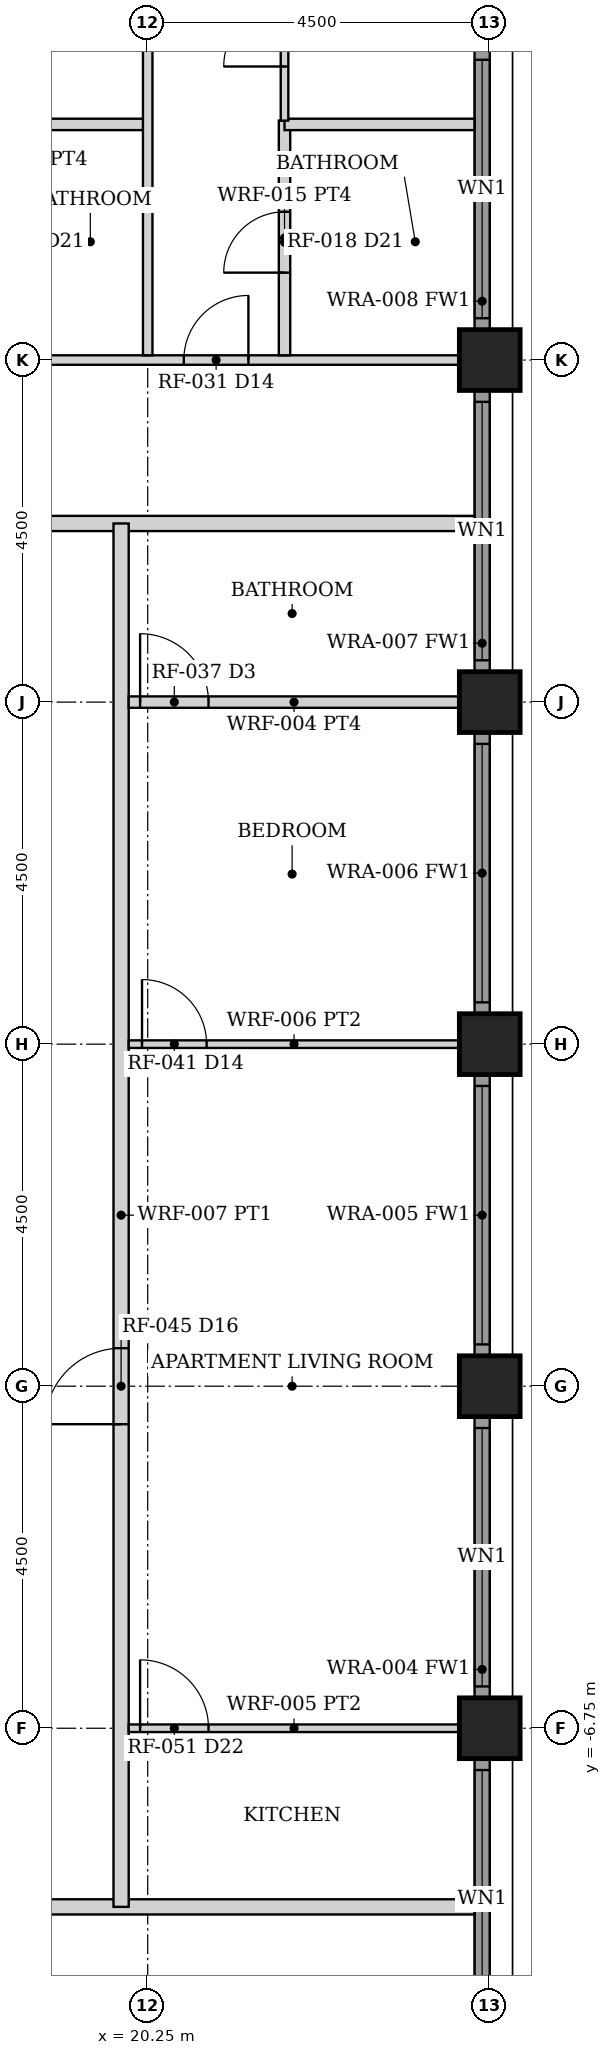
"""IFC4 building model, lengths in metres.
Left out: names, types, materials, properties, quantities, classifications, styles, units other than length and angle.
Written with IfcOpenShell. Run it as: python <this file> out.ifc"""

import sys

from ifc_helpers import new_model, si_unit, direction, frame, frame_2d, origin, origin_2d, place, context, subcontext, project, spatial, rectangle, hollow_rectangle, extrude, element, fill, save


model = new_model("IFC4")
c1 = context("Model", 3, precision=1e-05, world=origin(), true_north=direction((0.0, 1.0)))
c2 = subcontext(c1, "Body", "Model", "MODEL_VIEW")
j1 = project(units=[si_unit("LENGTHUNIT", "METRE"), si_unit("PLANEANGLEUNIT", "RADIAN")], contexts=[c1])
p1 = place(None, origin())
s1 = spatial("IfcSite", under=j1, at=p1, CompositionType="ELEMENT")
p2 = place(p1, origin())
s2 = spatial("IfcBuilding", under=s1, at=p2, CompositionType="ELEMENT")
p3 = place(p2, frame((0.0, 0.0, 79.0)))
s3 = spatial("IfcBuildingStorey", under=s2, at=p3, CompositionType="ELEMENT", Elevation=79.0)
for number, where, z_axis, x_axis in (
    (1, (24.75, -6.75, 0.0), (0.0, 0.0, 1.0), (1.0, 0.0, 0.0)),
    (2, (24.75, -2.25, 0.0), (0.0, 0.0, 1.0), (1.0, 0.0, 0.0)),
    (3, (24.75, 2.25, 0.0), (0.0, 0.0, 1.0), (1.0, 0.0, 0.0)),
    (4, (24.75, 6.75, 0.0), (0.0, 0.0, 1.0), (1.0, 0.0, 0.0)),
    (5, (24.75, 11.25, 0.0), (0.0, 0.0, 1.0), (1.0, 0.0, 0.0)),
):
    element("IfcColumn", number, at=place(p3, frame(where, z_axis=z_axis, x_axis=x_axis)), inside=s3, PredefinedType="COLUMN", context=c2, shape_type="SweptSolid", body=[
        extrude(hollow_rectangle(XDim=0.8, YDim=0.8, WallThickness=0.06, at=origin_2d()), origin(), (0.0, 0.0, 1.0), 3.5),
    ])
p4 = place(p3, frame((24.65, -10.845, 0.0), z_axis=(0.0, 0.0, 1.0), x_axis=(0.0, 1.0, 0.0)))
e6 = element("IfcWall", 6, at=p4, inside=s3, PredefinedType="SOLIDWALL", context=c2, shape_type="SweptSolid", body=[
    extrude(rectangle(XDim=3.69, YDim=0.2, at=frame_2d((1.845, 0.0))), origin(), (0.0, 0.0, 1.0), 2.379),
])
p5 = place(p4, frame((0.145, 0.0, 0.3)))
e7 = element("IfcOpeningElement", 7, at=p5, cuts=e6, PredefinedType="OPENING", context=c2, shape_type="SweptSolid", body=[
    extrude(rectangle(XDim=3.4, YDim=1.929, at=frame_2d((1.7, 0.964))), frame((0.0, 0.11, 0.0), z_axis=(0.0, -1.0, 0.0), x_axis=(1.0, 0.0, 0.0)), (0.0, 0.0, 1.0), 0.22),
])
p6 = place(p3, frame((24.65, -6.345, 0.0), z_axis=(0.0, 0.0, 1.0), x_axis=(0.0, 1.0, 0.0)))
e8 = element("IfcWall", 8, at=p6, inside=s3, PredefinedType="SOLIDWALL", context=c2, shape_type="SweptSolid", body=[
    extrude(rectangle(XDim=3.69, YDim=0.2, at=frame_2d((1.845, 0.0))), origin(), (0.0, 0.0, 1.0), 2.379),
])
p7 = place(p6, frame((0.145, 0.0, 0.3)))
e9 = element("IfcOpeningElement", 9, at=p7, cuts=e8, PredefinedType="OPENING", context=c2, shape_type="SweptSolid", body=[
    extrude(rectangle(XDim=3.4, YDim=1.929, at=frame_2d((1.7, 0.964))), frame((0.0, 0.11, 0.0), z_axis=(0.0, -1.0, 0.0), x_axis=(1.0, 0.0, 0.0)), (0.0, 0.0, 1.0), 0.22),
])
p8 = place(p3, frame((24.65, -1.845, 0.0), z_axis=(0.0, 0.0, 1.0), x_axis=(0.0, 1.0, 0.0)))
e10 = element("IfcWall", 10, at=p8, inside=s3, PredefinedType="SOLIDWALL", context=c2, shape_type="SweptSolid", body=[
    extrude(rectangle(XDim=3.69, YDim=0.2, at=frame_2d((1.845, 0.0))), origin(), (0.0, 0.0, 1.0), 2.379),
])
p9 = place(p8, frame((0.145, 0.0, 0.3)))
e11 = element("IfcOpeningElement", 11, at=p9, cuts=e10, PredefinedType="OPENING", context=c2, shape_type="SweptSolid", body=[
    extrude(rectangle(XDim=3.4, YDim=1.929, at=frame_2d((1.7, 0.964))), frame((0.0, 0.11, 0.0), z_axis=(0.0, -1.0, 0.0), x_axis=(1.0, 0.0, 0.0)), (0.0, 0.0, 1.0), 0.22),
])
p10 = place(p3, frame((24.65, 2.655, 0.0), z_axis=(0.0, 0.0, 1.0), x_axis=(0.0, 1.0, 0.0)))
e12 = element("IfcWall", 12, at=p10, inside=s3, PredefinedType="SOLIDWALL", context=c2, shape_type="SweptSolid", body=[
    extrude(rectangle(XDim=3.69, YDim=0.2, at=frame_2d((1.845, 0.0))), origin(), (0.0, 0.0, 1.0), 2.379),
])
p11 = place(p10, frame((0.145, 0.0, 0.3)))
e13 = element("IfcOpeningElement", 13, at=p11, cuts=e12, PredefinedType="OPENING", context=c2, shape_type="SweptSolid", body=[
    extrude(rectangle(XDim=3.4, YDim=1.929, at=frame_2d((1.7, 0.964))), frame((0.0, 0.11, 0.0), z_axis=(0.0, -1.0, 0.0), x_axis=(1.0, 0.0, 0.0)), (0.0, 0.0, 1.0), 0.22),
])
p12 = place(p3, frame((24.65, 7.155, 0.0), z_axis=(0.0, 0.0, 1.0), x_axis=(0.0, 1.0, 0.0)))
e14 = element("IfcWall", 14, at=p12, inside=s3, PredefinedType="SOLIDWALL", context=c2, shape_type="SweptSolid", body=[
    extrude(rectangle(XDim=3.69, YDim=0.2, at=frame_2d((1.845, 0.0))), origin(), (0.0, 0.0, 1.0), 2.379),
])
p13 = place(p12, frame((0.145, 0.0, 0.3)))
e15 = element("IfcOpeningElement", 15, at=p13, cuts=e14, PredefinedType="OPENING", context=c2, shape_type="SweptSolid", body=[
    extrude(rectangle(XDim=3.4, YDim=1.929, at=frame_2d((1.7, 0.964))), frame((0.0, 0.11, 0.0), z_axis=(0.0, -1.0, 0.0), x_axis=(1.0, 0.0, 0.0)), (0.0, 0.0, 1.0), 0.22),
])
p14 = place(p3, frame((24.65, 11.655, 0.0), z_axis=(0.0, 0.0, 1.0), x_axis=(0.0, 1.0, 0.0)))
e16 = element("IfcWall", 16, at=p14, inside=s3, PredefinedType="SOLIDWALL", context=c2, shape_type="SweptSolid", body=[
    extrude(rectangle(XDim=3.69, YDim=0.2, at=frame_2d((1.845, 0.0))), origin(), (0.0, 0.0, 1.0), 2.379),
])
p15 = place(p14, frame((0.145, 0.0, 0.3)))
e17 = element("IfcOpeningElement", 17, at=p15, cuts=e16, PredefinedType="OPENING", context=c2, shape_type="SweptSolid", body=[
    extrude(rectangle(XDim=3.4, YDim=1.929, at=frame_2d((1.7, 0.964))), frame((0.0, 0.11, 0.0), z_axis=(0.0, -1.0, 0.0), x_axis=(1.0, 0.0, 0.0)), (0.0, 0.0, 1.0), 0.22),
])
p16 = place(p3, frame((-24.55, 9.1, 0.0), z_axis=(0.0, 0.0, 1.0), x_axis=(1.0, 0.0, 0.0)))
e18 = element("IfcWall", 18, at=p16, inside=s3, PredefinedType="PARTITIONING", context=c2, shape_type="SweptSolid", body=[
    extrude(rectangle(XDim=49.1, YDim=0.2, at=frame_2d((24.55, 0.0))), origin(), (0.0, 0.0, 1.0), 2.373),
])
p17 = place(p16, frame((22.55, 0.0, 0.0)))
e19 = element("IfcOpeningElement", 19, at=p17, cuts=e18, PredefinedType="OPENING", context=c2, shape_type="SweptSolid", body=[
    extrude(rectangle(XDim=1.0, YDim=2.3, at=frame_2d((0.5, 1.15))), frame((0.0, 0.11, 0.0), z_axis=(0.0, -1.0, 0.0), x_axis=(1.0, 0.0, 0.0)), (0.0, 0.0, 1.0), 0.22),
])
p18 = place(p16, frame((21.05, 0.0, 0.0)))
e20 = element("IfcOpeningElement", 20, at=p18, cuts=e18, PredefinedType="OPENING", context=c2, shape_type="SweptSolid", body=[
    extrude(rectangle(XDim=1.0, YDim=2.3, at=frame_2d((0.5, 1.15))), frame((0.0, 0.11, 0.0), z_axis=(0.0, -1.0, 0.0), x_axis=(1.0, 0.0, 0.0)), (0.0, 0.0, 1.0), 0.22),
])
p19 = place(p3, frame((-24.55, -9.1, 0.0), z_axis=(0.0, 0.0, 1.0), x_axis=(1.0, 0.0, 0.0)))
e21 = element("IfcWall", 21, at=p19, inside=s3, PredefinedType="PARTITIONING", context=c2, shape_type="SweptSolid", body=[
    extrude(rectangle(XDim=49.1, YDim=0.2, at=frame_2d((24.55, 0.0))), origin(), (0.0, 0.0, 1.0), 2.373),
])
p20 = place(p19, frame((25.55, 0.0, 0.0)))
e22 = element("IfcOpeningElement", 22, at=p20, cuts=e21, PredefinedType="OPENING", context=c2, shape_type="SweptSolid", body=[
    extrude(rectangle(XDim=1.0, YDim=2.3, at=frame_2d((0.5, 1.15))), frame((0.0, 0.11, 0.0), z_axis=(0.0, -1.0, 0.0), x_axis=(1.0, 0.0, 0.0)), (0.0, 0.0, 1.0), 0.22),
])
p21 = place(p19, frame((27.05, 0.0, 0.0)))
e23 = element("IfcOpeningElement", 23, at=p21, cuts=e21, PredefinedType="OPENING", context=c2, shape_type="SweptSolid", body=[
    extrude(rectangle(XDim=1.0, YDim=2.3, at=frame_2d((0.5, 1.15))), frame((0.0, 0.11, 0.0), z_axis=(0.0, -1.0, 0.0), x_axis=(1.0, 0.0, 0.0)), (0.0, 0.0, 1.0), 0.22),
])
p22 = place(p3, frame((19.9, -9.1, 0.0), z_axis=(0.0, 0.0, 1.0), x_axis=(0.0, 1.0, 0.0)))
e24 = element("IfcWall", 24, at=p22, inside=s3, PredefinedType="PARTITIONING", context=c2, shape_type="SweptSolid", body=[
    extrude(rectangle(XDim=18.2, YDim=0.2, at=frame_2d((9.1, 0.0))), origin(), (0.0, 0.0, 1.0), 2.373),
])
p23 = place(p22, frame((6.35, 0.0, 0.0)))
e25 = element("IfcOpeningElement", 25, at=p23, cuts=e24, PredefinedType="OPENING", context=c2, shape_type="SweptSolid", body=[
    extrude(rectangle(XDim=1.0, YDim=2.3, at=frame_2d((0.5, 1.15))), frame((0.0, 0.11, 0.0), z_axis=(0.0, -1.0, 0.0), x_axis=(1.0, 0.0, 0.0)), (0.0, 0.0, 1.0), 0.22),
])
p24 = place(p3, frame((-2.15, 11.25, 0.0), z_axis=(0.0, 0.0, 1.0), x_axis=(1.0, 0.0, 0.0)))
e26 = element("IfcWall", 26, at=p24, inside=s3, PredefinedType="PARTITIONING", context=c2, shape_type="SweptSolid", body=[
    extrude(rectangle(XDim=26.5, YDim=0.125, at=frame_2d((13.25, 0.0))), origin(), (0.0, 0.0, 1.0), 2.373),
])
p25 = place(p24, frame((0.85, 0.0, 0.0)))
e27 = element("IfcOpeningElement", 27, at=p25, cuts=e26, PredefinedType="OPENING", context=c2, shape_type="SweptSolid", body=[
    extrude(rectangle(XDim=0.9, YDim=2.1, at=frame_2d((0.45, 1.05))), frame((0.0, 0.073, 0.0), z_axis=(0.0, -1.0, 0.0), x_axis=(1.0, 0.0, 0.0)), (0.0, 0.0, 1.0), 0.145),
])
p26 = place(p24, frame((5.95, 0.0, 0.0)))
e28 = element("IfcOpeningElement", 28, at=p26, cuts=e26, PredefinedType="OPENING", context=c2, shape_type="SweptSolid", body=[
    extrude(rectangle(XDim=1.4, YDim=2.1, at=frame_2d((0.7, 1.05))), frame((0.0, 0.073, 0.0), z_axis=(0.0, -1.0, 0.0), x_axis=(1.0, 0.0, 0.0)), (0.0, 0.0, 1.0), 0.145),
])
p27 = place(p24, frame((9.375, 0.0, 0.0)))
e29 = element("IfcOpeningElement", 29, at=p27, cuts=e26, PredefinedType="OPENING", context=c2, shape_type="SweptSolid", body=[
    extrude(rectangle(XDim=0.85, YDim=2.1, at=frame_2d((0.425, 1.05))), frame((0.0, 0.073, 0.0), z_axis=(0.0, -1.0, 0.0), x_axis=(1.0, 0.0, 0.0)), (0.0, 0.0, 1.0), 0.145),
])
p28 = place(p24, frame((11.57, 0.0, 0.0)))
e30 = element("IfcOpeningElement", 30, at=p28, cuts=e26, PredefinedType="OPENING", context=c2, shape_type="SweptSolid", body=[
    extrude(rectangle(XDim=0.9, YDim=2.1, at=frame_2d((0.45, 1.05))), frame((0.0, 0.073, 0.0), z_axis=(0.0, -1.0, 0.0), x_axis=(1.0, 0.0, 0.0)), (0.0, 0.0, 1.0), 0.145),
])
p29 = place(p24, frame((13.875, 0.0, 0.0)))
e31 = element("IfcOpeningElement", 31, at=p29, cuts=e26, PredefinedType="OPENING", context=c2, shape_type="SweptSolid", body=[
    extrude(rectangle(XDim=0.85, YDim=2.1, at=frame_2d((0.425, 1.05))), frame((0.0, 0.073, 0.0), z_axis=(0.0, -1.0, 0.0), x_axis=(1.0, 0.0, 0.0)), (0.0, 0.0, 1.0), 0.145),
])
p30 = place(p24, frame((18.375, 0.0, 0.0)))
e32 = element("IfcOpeningElement", 32, at=p30, cuts=e26, PredefinedType="OPENING", context=c2, shape_type="SweptSolid", body=[
    extrude(rectangle(XDim=0.85, YDim=2.1, at=frame_2d((0.425, 1.05))), frame((0.0, 0.073, 0.0), z_axis=(0.0, -1.0, 0.0), x_axis=(1.0, 0.0, 0.0)), (0.0, 0.0, 1.0), 0.145),
])
p31 = place(p24, frame((22.875, 0.0, 0.0)))
e33 = element("IfcOpeningElement", 33, at=p31, cuts=e26, PredefinedType="OPENING", context=c2, shape_type="SweptSolid", body=[
    extrude(rectangle(XDim=0.85, YDim=2.1, at=frame_2d((0.425, 1.05))), frame((0.0, 0.073, 0.0), z_axis=(0.0, -1.0, 0.0), x_axis=(1.0, 0.0, 0.0)), (0.0, 0.0, 1.0), 0.145),
])
p32 = place(p3, frame((17.55, 14.35, 0.0), z_axis=(0.0, 0.0, 1.0), x_axis=(1.0, 0.0, 0.0)))
e34 = element("IfcWall", 34, at=p32, inside=s3, PredefinedType="PARTITIONING", context=c2, shape_type="SweptSolid", body=[
    extrude(rectangle(XDim=2.64, YDim=0.15, at=frame_2d((1.32, 0.0))), origin(), (0.0, 0.0, 1.0), 2.373),
])
p33 = place(p3, frame((20.25, 11.312, 0.0), z_axis=(0.0, 0.0, 1.0), x_axis=(0.0, 1.0, 0.0)))
e35 = element("IfcWall", 35, at=p33, inside=s3, PredefinedType="PARTITIONING", context=c2, shape_type="SweptSolid", body=[
    extrude(rectangle(XDim=13.038, YDim=0.125, at=frame_2d((6.519, 0.0))), origin(), (0.0, 0.0, 1.0), 2.373),
])
p34 = place(p3, frame((22.05, 11.312, 0.0), z_axis=(0.0, 0.0, 1.0), x_axis=(0.0, 1.0, 0.0)))
e36 = element("IfcWall", 36, at=p34, inside=s3, PredefinedType="PARTITIONING", context=c2, shape_type="SweptSolid", body=[
    extrude(rectangle(XDim=3.087, YDim=0.15, at=frame_2d((1.544, 0.0))), origin(), (0.0, 0.0, 1.0), 2.373),
])
p35 = place(p34, frame((1.087, 0.0, 0.0)))
e37 = element("IfcOpeningElement", 37, at=p35, cuts=e36, PredefinedType="OPENING", context=c2, shape_type="SweptSolid", body=[
    extrude(rectangle(XDim=0.8, YDim=2.1, at=frame_2d((0.4, 1.05))), frame((0.0, 0.085, 0.0), z_axis=(0.0, -1.0, 0.0), x_axis=(1.0, 0.0, 0.0)), (0.0, 0.0, 1.0), 0.17),
])
p36 = place(p3, frame((22.05, 14.35, 0.0), z_axis=(0.0, 0.0, 1.0), x_axis=(1.0, 0.0, 0.0)))
e38 = element("IfcWall", 38, at=p36, inside=s3, PredefinedType="PARTITIONING", context=c2, shape_type="SweptSolid", body=[
    extrude(rectangle(XDim=2.5, YDim=0.15, at=frame_2d((1.25, 0.0))), origin(), (0.0, 0.0, 1.0), 2.373),
])
p37 = place(p3, frame((22.05, 14.4, 0.0), z_axis=(0.0, 0.0, 1.0), x_axis=(0.0, 1.0, 0.0)))
e39 = element("IfcWall", 39, at=p37, inside=s3, PredefinedType="PARTITIONING", context=c2, shape_type="SweptSolid", body=[
    extrude(rectangle(XDim=2.274, YDim=0.1, at=frame_2d((1.137, 0.0))), origin(), (0.0, 0.0, 1.0), 2.373),
])
p38 = place(p37, frame((0.712, 0.0, 0.0)))
e40 = element("IfcOpeningElement", 40, at=p38, cuts=e39, PredefinedType="OPENING", context=c2, shape_type="SweptSolid", body=[
    extrude(rectangle(XDim=0.8, YDim=2.1, at=frame_2d((0.4, 1.05))), frame((0.0, 0.06, 0.0), z_axis=(0.0, -1.0, 0.0), x_axis=(1.0, 0.0, 0.0)), (0.0, 0.0, 1.0), 0.12),
])
p39 = place(p3, frame((20.0, -6.75, 0.0), z_axis=(0.0, 0.0, 1.0), x_axis=(1.0, 0.0, 0.0)))
e41 = element("IfcWall", 41, at=p39, inside=s3, PredefinedType="PARTITIONING", context=c2, shape_type="SweptSolid", body=[
    extrude(rectangle(XDim=4.35, YDim=0.1, at=frame_2d((2.175, 0.0))), origin(), (0.0, 0.0, 1.0), 2.373),
])
p40 = place(p39, frame((0.15, 0.0, 0.0)))
e42 = element("IfcOpeningElement", 42, at=p40, cuts=e41, PredefinedType="OPENING", context=c2, shape_type="SweptSolid", body=[
    extrude(rectangle(XDim=0.9, YDim=2.1, at=frame_2d((0.45, 1.05))), frame((0.0, 0.06, 0.0), z_axis=(0.0, -1.0, 0.0), x_axis=(1.0, 0.0, 0.0)), (0.0, 0.0, 1.0), 0.12),
])
p41 = place(p3, frame((20.0, 2.25, 0.0), z_axis=(0.0, 0.0, 1.0), x_axis=(1.0, 0.0, 0.0)))
e43 = element("IfcWall", 43, at=p41, inside=s3, PredefinedType="PARTITIONING", context=c2, shape_type="SweptSolid", body=[
    extrude(rectangle(XDim=4.35, YDim=0.1, at=frame_2d((2.175, 0.0))), origin(), (0.0, 0.0, 1.0), 2.373),
])
p42 = place(p41, frame((0.175, 0.0, 0.0)))
e44 = element("IfcOpeningElement", 44, at=p42, cuts=e43, PredefinedType="OPENING", context=c2, shape_type="SweptSolid", body=[
    extrude(rectangle(XDim=0.85, YDim=2.1, at=frame_2d((0.425, 1.05))), frame((0.0, 0.06, 0.0), z_axis=(0.0, -1.0, 0.0), x_axis=(1.0, 0.0, 0.0)), (0.0, 0.0, 1.0), 0.12),
])
p43 = place(p3, frame((20.0, 6.75, 0.0), z_axis=(0.0, 0.0, 1.0), x_axis=(1.0, 0.0, 0.0)))
e45 = element("IfcWall", 45, at=p43, inside=s3, PredefinedType="PARTITIONING", context=c2, shape_type="SweptSolid", body=[
    extrude(rectangle(XDim=4.35, YDim=0.15, at=frame_2d((2.175, 0.0))), origin(), (0.0, 0.0, 1.0), 2.373),
])
p44 = place(p43, frame((0.15, 0.0, 0.0)))
e46 = element("IfcOpeningElement", 46, at=p44, cuts=e45, PredefinedType="OPENING", context=c2, shape_type="SweptSolid", body=[
    extrude(rectangle(XDim=0.9, YDim=2.1, at=frame_2d((0.45, 1.05))), frame((0.0, 0.085, 0.0), z_axis=(0.0, -1.0, 0.0), x_axis=(1.0, 0.0, 0.0)), (0.0, 0.0, 1.0), 0.17),
])
p45 = place(p5, origin())
e47 = element("IfcWindow", 47, at=p45, inside=s3, PartitioningType="SINGLE_PANEL", PredefinedType="WINDOW", context=c2, shape_type="SweptSolid", body=[
    extrude(rectangle(XDim=3.4, YDim=1.929, at=frame_2d((1.7, 0.964))), frame((0.0, 0.03, 0.0), z_axis=(0.0, -1.0, 0.0), x_axis=(1.0, 0.0, 0.0)), (0.0, 0.0, 1.0), 0.06),
])
fill(e7, e47)
p46 = place(p7, origin())
e48 = element("IfcWindow", 48, at=p46, inside=s3, PartitioningType="SINGLE_PANEL", PredefinedType="WINDOW", context=c2, shape_type="SweptSolid", body=[
    extrude(rectangle(XDim=3.4, YDim=1.929, at=frame_2d((1.7, 0.964))), frame((0.0, 0.03, 0.0), z_axis=(0.0, -1.0, 0.0), x_axis=(1.0, 0.0, 0.0)), (0.0, 0.0, 1.0), 0.06),
])
fill(e9, e48)
p47 = place(p9, origin())
e49 = element("IfcWindow", 49, at=p47, inside=s3, PartitioningType="SINGLE_PANEL", PredefinedType="WINDOW", context=c2, shape_type="SweptSolid", body=[
    extrude(rectangle(XDim=3.4, YDim=1.929, at=frame_2d((1.7, 0.964))), frame((0.0, 0.03, 0.0), z_axis=(0.0, -1.0, 0.0), x_axis=(1.0, 0.0, 0.0)), (0.0, 0.0, 1.0), 0.06),
])
fill(e11, e49)
p48 = place(p11, origin())
e50 = element("IfcWindow", 50, at=p48, inside=s3, PartitioningType="SINGLE_PANEL", PredefinedType="WINDOW", context=c2, shape_type="SweptSolid", body=[
    extrude(rectangle(XDim=3.4, YDim=1.929, at=frame_2d((1.7, 0.964))), frame((0.0, 0.03, 0.0), z_axis=(0.0, -1.0, 0.0), x_axis=(1.0, 0.0, 0.0)), (0.0, 0.0, 1.0), 0.06),
])
fill(e13, e50)
p49 = place(p13, origin())
e51 = element("IfcWindow", 51, at=p49, inside=s3, PartitioningType="SINGLE_PANEL", PredefinedType="WINDOW", context=c2, shape_type="SweptSolid", body=[
    extrude(rectangle(XDim=3.4, YDim=1.929, at=frame_2d((1.7, 0.964))), frame((0.0, 0.03, 0.0), z_axis=(0.0, -1.0, 0.0), x_axis=(1.0, 0.0, 0.0)), (0.0, 0.0, 1.0), 0.06),
])
fill(e15, e51)
p50 = place(p15, origin())
e52 = element("IfcWindow", 52, at=p50, inside=s3, PartitioningType="SINGLE_PANEL", PredefinedType="WINDOW", context=c2, shape_type="SweptSolid", body=[
    extrude(rectangle(XDim=3.4, YDim=1.929, at=frame_2d((1.7, 0.964))), frame((0.0, 0.03, 0.0), z_axis=(0.0, -1.0, 0.0), x_axis=(1.0, 0.0, 0.0)), (0.0, 0.0, 1.0), 0.06),
])
fill(e17, e52)
p51 = place(p31, origin())
e53 = element("IfcDoor", 53, at=p51, inside=s3, OperationType="SINGLE_SWING_RIGHT", PredefinedType="DOOR", context=c2, shape_type="SweptSolid", body=[
    extrude(rectangle(XDim=0.85, YDim=2.1, at=frame_2d((0.425, 1.05))), frame((0.0, 0.025, 0.0), z_axis=(0.0, -1.0, 0.0), x_axis=(1.0, 0.0, 0.0)), (0.0, 0.0, 1.0), 0.05),
])
fill(e33, e53)
p52 = place(p35, origin())
e54 = element("IfcDoor", 54, at=p52, inside=s3, OperationType="SINGLE_SWING_LEFT", PredefinedType="DOOR", context=c2, shape_type="SweptSolid", body=[
    extrude(rectangle(XDim=0.8, YDim=2.1, at=frame_2d((0.4, 1.05))), frame((0.0, 0.025, 0.0), z_axis=(0.0, -1.0, 0.0), x_axis=(1.0, 0.0, 0.0)), (0.0, 0.0, 1.0), 0.05),
])
fill(e37, e54)
p53 = place(p38, origin())
e55 = element("IfcDoor", 55, at=p53, inside=s3, OperationType="SINGLE_SWING_LEFT", PredefinedType="DOOR", context=c2, shape_type="SweptSolid", body=[
    extrude(rectangle(XDim=0.8, YDim=2.1, at=frame_2d((0.4, 1.05))), frame((0.0, 0.025, 0.0), z_axis=(0.0, -1.0, 0.0), x_axis=(1.0, 0.0, 0.0)), (0.0, 0.0, 1.0), 0.05),
])
fill(e40, e55)
p54 = place(p40, origin())
e56 = element("IfcDoor", 56, at=p54, inside=s3, OperationType="SINGLE_SWING_LEFT", PredefinedType="DOOR", context=c2, shape_type="SweptSolid", body=[
    extrude(rectangle(XDim=0.9, YDim=2.1, at=frame_2d((0.45, 1.05))), frame((0.0, 0.025, 0.0), z_axis=(0.0, -1.0, 0.0), x_axis=(1.0, 0.0, 0.0)), (0.0, 0.0, 1.0), 0.05),
])
fill(e42, e56)
p55 = place(p42, origin())
e57 = element("IfcDoor", 57, at=p55, inside=s3, OperationType="SINGLE_SWING_LEFT", PredefinedType="DOOR", context=c2, shape_type="SweptSolid", body=[
    extrude(rectangle(XDim=0.85, YDim=2.1, at=frame_2d((0.425, 1.05))), frame((0.0, 0.025, 0.0), z_axis=(0.0, -1.0, 0.0), x_axis=(1.0, 0.0, 0.0)), (0.0, 0.0, 1.0), 0.05),
])
fill(e44, e57)
p56 = place(p44, origin())
e58 = element("IfcDoor", 58, at=p56, inside=s3, OperationType="SINGLE_SWING_LEFT", PredefinedType="DOOR", context=c2, shape_type="SweptSolid", body=[
    extrude(rectangle(XDim=0.9, YDim=2.1, at=frame_2d((0.45, 1.05))), frame((0.0, 0.025, 0.0), z_axis=(0.0, -1.0, 0.0), x_axis=(1.0, 0.0, 0.0)), (0.0, 0.0, 1.0), 0.05),
])
fill(e46, e58)
p57 = place(p23, origin())
e59 = element("IfcDoor", 59, at=p57, inside=s3, OperationType="SINGLE_SWING_LEFT", PredefinedType="DOOR", context=c2, shape_type="SweptSolid", body=[
    extrude(rectangle(XDim=1.0, YDim=2.3, at=frame_2d((0.5, 1.15))), frame((0.0, 0.025, 0.0), z_axis=(0.0, -1.0, 0.0), x_axis=(1.0, 0.0, 0.0)), (0.0, 0.0, 1.0), 0.05),
])
fill(e25, e59)
save(model, sys.argv[1])
